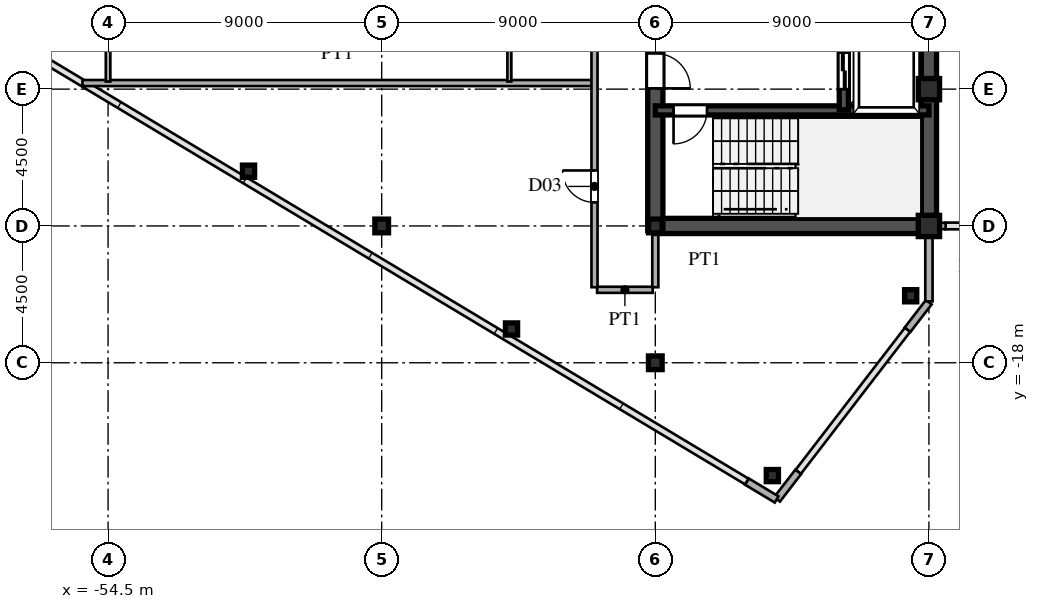
"""IFC4 building model, lengths in metres.
Left out: names, types, materials, properties, quantities, classifications, styles, units other than length and angle.
Written with IfcOpenShell. Run it as: python <this file> out.ifc"""

import sys

from ifc_helpers import new_model, si_unit, direction, frame, frame_2d, origin, origin_2d, place, context, subcontext, project, spatial, rectangle, hollow_rectangle, i_section, extrude, source, transform, mapped, element, fill, save


model = new_model("IFC4")
c1 = context("Model", 3, precision=1e-05, world=origin(), true_north=direction((0.0, 1.0)))
c2 = subcontext(c1, "Body", "Model", "MODEL_VIEW")
j1 = project(units=[si_unit("LENGTHUNIT", "METRE"), si_unit("PLANEANGLEUNIT", "RADIAN")], contexts=[c1])
p1 = place(None, origin())
s1 = spatial("IfcSite", under=j1, at=p1, CompositionType="ELEMENT")
p2 = place(p1, origin())
s2 = spatial("IfcBuilding", under=s1, at=p2, CompositionType="ELEMENT")
p3 = place(p2, frame((0.0, 0.0, 239.4)))
s3 = spatial("IfcBuildingStorey", under=s2, at=p3, CompositionType="ELEMENT", Elevation=239.4)
m1 = source(origin(), c2, "Body", "SweptSolid", [
    extrude(hollow_rectangle(XDim=0.7, YDim=0.7, WallThickness=0.03, at=origin_2d()), origin(), (0.0, 0.0, 1.0), 3.75),
])
for number, where, z_axis, x_axis in (
    (1, (-27.5, -13.5, 0.0), (0.0, 0.0, 1.0), (1.0, 0.0, 0.0)),
    (2, (-27.5, -9.0, 0.0), (0.0, 0.0, 1.0), (1.0, 0.0, 0.0)),
):
    element("IfcColumn", number, at=place(p3, frame(where, z_axis=z_axis, x_axis=x_axis)), inside=s3, PredefinedType="COLUMN", context=c2, shape_type="MappedRepresentation", body=[
        mapped(m1, transform((0.0, 0.0, 0.0), scale=1.0)),
    ])
m2 = source(origin(), c2, "Body", "SweptSolid", [
    extrude(i_section(OverallWidth=0.45, OverallDepth=0.45, WebThickness=0.016, FlangeThickness=0.025, at=origin_2d()), origin(), (0.0, 0.0, 1.0), 3.75),
])
for number, where, z_axis, x_axis in (
    (3, (-36.5, -18.0, 0.0), (0.0, 0.0, 1.0), (1.0, 0.0, 0.0)),
    (4, (-36.5, -13.5, 0.0), (0.0, 0.0, 1.0), (1.0, 0.0, 0.0)),
    (5, (-45.5, -13.5, 0.0), (0.0, 0.0, 1.0), (1.0, 0.0, 0.0)),
):
    element("IfcColumn", number, at=place(p3, frame(where, z_axis=z_axis, x_axis=x_axis)), inside=s3, PredefinedType="COLUMN", context=c2, shape_type="MappedRepresentation", body=[
        mapped(m2, transform((0.0, 0.0, 0.0), scale=1.0)),
    ])
m3 = source(origin(), c2, "Body", "SweptSolid", [
    extrude(hollow_rectangle(XDim=0.4, YDim=0.4, WallThickness=0.016, at=origin_2d()), origin(), (0.0, 0.0, 1.0), 3.75),
])
for number, where, z_axis, x_axis in (
    (6, (-28.1, -15.796, 0.0), (0.0, 0.0, 1.0), (1.0, 0.0, 0.0)),
    (7, (-32.65, -21.71, 0.0), (0.0, 0.0, 1.0), (1.0, 0.0, 0.0)),
    (8, (-41.23, -16.889, 0.0), (0.0, 0.0, 1.0), (1.0, 0.0, 0.0)),
    (9, (-49.88, -11.699, 0.0), (0.0, 0.0, 1.0), (1.0, 0.0, 0.0)),
):
    element("IfcColumn", number, at=place(p3, frame(where, z_axis=z_axis, x_axis=x_axis)), inside=s3, PredefinedType="COLUMN", context=c2, shape_type="MappedRepresentation", body=[
        mapped(m3, transform((0.0, 0.0, 0.0), scale=1.0)),
    ])
p4 = place(p3, frame((-27.5, -15.98, 0.0), z_axis=(0.0, 0.0, 1.0), x_axis=(0.0, 1.0, 0.0)))
e10 = element("IfcWall", 10, at=p4, inside=s3, PredefinedType="SOLIDWALL", context=c2, shape_type="SweptSolid", body=[
    extrude(rectangle(XDim=1.605, YDim=0.24, at=frame_2d((0.803, 0.0))), origin(), (0.0, 0.0, 1.0), 3.53),
])
p5 = place(p3, frame((-27.5, -14.375, 0.0), z_axis=(0.0, 0.0, 1.0), x_axis=(0.0, 1.0, 0.0)))
e11 = element("IfcWall", 11, at=p5, inside=s3, PredefinedType="SOLIDWALL", context=c2, shape_type="SweptSolid", body=[
    extrude(rectangle(XDim=0.62, YDim=0.24, at=frame_2d((0.31, 0.0))), origin(), (0.0, 0.0, 1.0), 3.03),
])
for number, where, z_axis, x_axis in (
    (12, (-33.486, -21.908, 0.0), (0.0, 0.0, 1.0), (0.857, -0.515, 0.0)),
    (13, (-32.494, -22.492, 0.0), (0.0, 0.0, 1.0), (0.61, 0.793, 0.0)),
    (14, (-28.201, -16.912, 0.0), (0.0, 0.0, 1.0), (0.61, 0.793, 0.0)),
):
    element("IfcWall", number, at=place(p3, frame(where, z_axis=z_axis, x_axis=x_axis)), inside=s3, PredefinedType="SOLIDWALL", context=c2, shape_type="SweptSolid", body=[
        extrude(rectangle(XDim=1.14, YDim=0.24, at=frame_2d((0.57, 0.0))), origin(), (0.0, 0.0, 1.0), 3.53),
    ])
p6 = place(p3, frame((-27.49, -13.5, 0.0), z_axis=(0.0, 0.0, 1.0), x_axis=(1.0, 0.0, 0.0)))
e15 = element("IfcWall", 15, at=p6, inside=s3, PredefinedType="SOLIDWALL", context=c2, shape_type="SweptSolid", body=[
    extrude(rectangle(XDim=0.54, YDim=0.21, at=frame_2d((0.27, 0.0))), origin(), (0.0, 0.0, 1.0), 3.03),
])
p7 = place(p3, frame((-27.5, -13.5, 0.0), z_axis=(0.0, 0.0, 1.0), x_axis=(0.0, 1.0, 0.0)))
e16 = element("IfcWall", 16, at=p7, inside=s3, PredefinedType="SHEAR", context=c2, shape_type="SweptSolid", body=[
    extrude(rectangle(XDim=12.2, YDim=0.5, at=frame_2d((6.1, 0.0))), origin(), (0.0, 0.0, 1.0), 3.53),
])
p8 = place(p3, frame((-36.5, -13.5, 0.0), z_axis=(0.0, 0.0, 1.0), x_axis=(1.0, 0.0, 0.0)))
e17 = element("IfcWall", 17, at=p8, inside=s3, PredefinedType="SHEAR", context=c2, shape_type="SweptSolid", body=[
    extrude(rectangle(XDim=9.0, YDim=0.5, at=frame_2d((4.5, 0.0))), origin(), (0.0, 0.0, 1.0), 3.53),
])
p9 = place(p3, frame((-36.5, -13.65, 0.0), z_axis=(0.0, 0.0, 1.0), x_axis=(0.0, 1.0, 0.0)))
e18 = element("IfcWall", 18, at=p9, inside=s3, PredefinedType="SHEAR", context=c2, shape_type="SweptSolid", body=[
    extrude(rectangle(XDim=7.15, YDim=0.5, at=frame_2d((3.575, 0.0))), origin(), (0.0, 0.0, 1.0), 3.53),
])
p10 = place(p9, frame((4.675, 0.0, 0.0)))
e19 = element("IfcOpeningElement", 19, at=p10, cuts=e18, PredefinedType="OPENING", context=c2, shape_type="SweptSolid", body=[
    extrude(rectangle(XDim=1.15, YDim=2.2, at=frame_2d((0.575, 1.1))), frame((0.0, 0.26, 0.0), z_axis=(0.0, -1.0, 0.0), x_axis=(1.0, 0.0, 0.0)), (0.0, 0.0, 1.0), 0.52),
])
p11 = place(p3, frame((-36.5, -9.7, 0.0), z_axis=(0.0, 0.0, 1.0), x_axis=(1.0, 0.0, 0.0)))
e20 = element("IfcWall", 20, at=p11, inside=s3, PredefinedType="SHEAR", context=c2, shape_type="SweptSolid", body=[
    extrude(rectangle(XDim=9.0, YDim=0.3, at=frame_2d((4.5, 0.0))), origin(), (0.0, 0.0, 1.0), 3.53),
])
p12 = place(p11, frame((0.6, 0.0, 0.0)))
e21 = element("IfcOpeningElement", 21, at=p12, cuts=e20, PredefinedType="OPENING", context=c2, shape_type="SweptSolid", body=[
    extrude(rectangle(XDim=1.1, YDim=2.2, at=frame_2d((0.55, 1.1))), frame((0.0, 0.16, 0.0), z_axis=(0.0, -1.0, 0.0), x_axis=(1.0, 0.0, 0.0)), (0.0, 0.0, 1.0), 0.32),
])
p13 = place(p3, frame((-30.3, -9.68, 0.0), z_axis=(0.0, 0.0, 1.0), x_axis=(0.0, 1.0, 0.0)))
e22 = element("IfcWall", 22, at=p13, inside=s3, PredefinedType="SHEAR", context=c2, shape_type="SweptSolid", body=[
    extrude(rectangle(XDim=2.56, YDim=0.3, at=frame_2d((1.28, 0.0))), origin(), (0.0, 0.0, 1.0), 3.53),
])
p14 = place(p13, frame((0.68, 0.0, 0.0)))
e23 = element("IfcOpeningElement", 23, at=p14, cuts=e22, PredefinedType="OPENING", context=c2, shape_type="SweptSolid", body=[
    extrude(rectangle(XDim=1.2, YDim=2.25, at=frame_2d((0.6, 1.125))), frame((0.0, 0.16, 0.0), z_axis=(0.0, -1.0, 0.0), x_axis=(1.0, 0.0, 0.0)), (0.0, 0.0, 1.0), 0.32),
])
p15 = place(p3, frame((-38.415, -15.6, 0.0), z_axis=(0.0, 0.0, 1.0), x_axis=(1.0, 0.0, 0.0)))
e24 = element("IfcWall", 24, at=p15, inside=s3, PredefinedType="PARTITIONING", context=c2, shape_type="SweptSolid", body=[
    extrude(rectangle(XDim=1.83, YDim=0.2, at=frame_2d((0.915, 0.0))), origin(), (0.0, 0.0, 1.0), 3.53),
])
p16 = place(p3, frame((-55.343, -8.8, 0.0), z_axis=(0.0, 0.0, 1.0), x_axis=(1.0, 0.0, 0.0)))
e25 = element("IfcWall", 25, at=p16, inside=s3, PredefinedType="PARTITIONING", context=c2, shape_type="SweptSolid", body=[
    extrude(rectangle(XDim=16.763, YDim=0.2, at=frame_2d((8.381, 0.0))), origin(), (0.0, 0.0, 1.0), 3.53),
])
p17 = place(p3, frame((-54.5, -8.75, 0.0), z_axis=(0.0, 0.0, 1.0), x_axis=(0.0, 1.0, 0.0)))
e26 = element("IfcWall", 26, at=p17, inside=s3, PredefinedType="PARTITIONING", context=c2, shape_type="SweptSolid", body=[
    extrude(rectangle(XDim=12.3, YDim=0.15, at=frame_2d((6.15, 0.0))), origin(), (0.0, 0.0, 1.0), 2.93),
])
p18 = place(p17, frame((5.675, 0.0, 0.0)))
e27 = element("IfcOpeningElement", 27, at=p18, cuts=e26, PredefinedType="OPENING", context=c2, shape_type="SweptSolid", body=[
    extrude(rectangle(XDim=0.95, YDim=2.15, at=frame_2d((0.475, 1.075))), frame((0.0, 0.085, 0.0), z_axis=(0.0, -1.0, 0.0), x_axis=(1.0, 0.0, 0.0)), (0.0, 0.0, 1.0), 0.17),
])
p19 = place(p3, frame((-41.3, -8.75, 0.0), z_axis=(0.0, 0.0, 1.0), x_axis=(0.0, 1.0, 0.0)))
e28 = element("IfcWall", 28, at=p19, inside=s3, PredefinedType="PARTITIONING", context=c2, shape_type="SweptSolid", body=[
    extrude(rectangle(XDim=3.246, YDim=0.13, at=frame_2d((1.623, 0.0))), origin(), (0.0, 0.0, 1.0), 3.53),
])
p20 = place(p3, frame((-38.5, -15.515, 0.0), z_axis=(0.0, 0.0, 1.0), x_axis=(0.0, 1.0, 0.0)))
e29 = element("IfcWall", 29, at=p20, inside=s3, PredefinedType="PARTITIONING", context=c2, shape_type="SweptSolid", body=[
    extrude(rectangle(XDim=31.03, YDim=0.2, at=frame_2d((15.515, 0.0))), origin(), (0.0, 0.0, 1.0), 3.53),
])
p21 = place(p20, frame((2.79, 0.0, 0.0)))
e30 = element("IfcOpeningElement", 30, at=p21, cuts=e29, PredefinedType="OPENING", context=c2, shape_type="SweptSolid", body=[
    extrude(rectangle(XDim=1.05, YDim=2.25, at=frame_2d((0.525, 1.125))), frame((0.0, 0.11, 0.0), z_axis=(0.0, -1.0, 0.0), x_axis=(1.0, 0.0, 0.0)), (0.0, 0.0, 1.0), 0.22),
])
p22 = place(p20, frame((12.204, 0.0, 0.0)))
e31 = element("IfcOpeningElement", 31, at=p22, cuts=e29, PredefinedType="OPENING", context=c2, shape_type="SweptSolid", body=[
    extrude(rectangle(XDim=1.05, YDim=2.25, at=frame_2d((0.525, 1.125))), frame((0.0, 0.11, 0.0), z_axis=(0.0, -1.0, 0.0), x_axis=(1.0, 0.0, 0.0)), (0.0, 0.0, 1.0), 0.22),
])
p23 = place(p20, frame((24.59, 0.0, 0.0)))
e32 = element("IfcOpeningElement", 32, at=p23, cuts=e29, PredefinedType="OPENING", context=c2, shape_type="SweptSolid", body=[
    extrude(rectangle(XDim=1.05, YDim=2.25, at=frame_2d((0.525, 1.125))), frame((0.0, 0.11, 0.0), z_axis=(0.0, -1.0, 0.0), x_axis=(1.0, 0.0, 0.0)), (0.0, 0.0, 1.0), 0.22),
])
p24 = place(p3, frame((-36.5, -15.515, 0.0), z_axis=(0.0, 0.0, 1.0), x_axis=(0.0, 1.0, 0.0)))
e33 = element("IfcWall", 33, at=p24, inside=s3, PredefinedType="PARTITIONING", context=c2, shape_type="SweptSolid", body=[
    extrude(rectangle(XDim=1.76, YDim=0.2, at=frame_2d((0.88, 0.0))), origin(), (0.0, 0.0, 1.0), 2.93),
])
m4 = source(origin(), c2, "Body", "SweptSolid", [
    extrude(rectangle(XDim=1.15, YDim=2.2, at=frame_2d((0.575, 1.1))), frame((0.0, 0.025, 0.0), z_axis=(0.0, -1.0, 0.0), x_axis=(1.0, 0.0, 0.0)), (0.0, 0.0, 1.0), 0.05),
])
p25 = place(p10, frame((1.15, 0.0, 0.0), z_axis=(0.0, 0.0, 1.0), x_axis=(-1.0, 0.0, 0.0)))
e34 = element("IfcDoor", 34, at=p25, inside=s3, OperationType="SINGLE_SWING_LEFT", PredefinedType="DOOR", context=c2, shape_type="MappedRepresentation", body=[
    mapped(m4, transform((0.0, 0.0, 0.0), scale=1.0)),
])
fill(e19, e34)
m5 = source(origin(), c2, "Body", "SweptSolid", [
    extrude(rectangle(XDim=1.1, YDim=2.2, at=frame_2d((0.55, 1.1))), frame((0.0, 0.025, 0.0), z_axis=(0.0, -1.0, 0.0), x_axis=(1.0, 0.0, 0.0)), (0.0, 0.0, 1.0), 0.05),
])
p26 = place(p12, frame((1.1, 0.0, 0.0), z_axis=(0.0, 0.0, 1.0), x_axis=(-1.0, 0.0, 0.0)))
e35 = element("IfcDoor", 35, at=p26, inside=s3, OperationType="SINGLE_SWING_LEFT", PredefinedType="DOOR", context=c2, shape_type="MappedRepresentation", body=[
    mapped(m5, transform((0.0, 0.0, 0.0), scale=1.0)),
])
fill(e21, e35)
m6 = source(origin(), c2, "Body", "SweptSolid", [
    extrude(rectangle(XDim=1.2, YDim=2.25, at=frame_2d((0.6, 1.125))), frame((0.0, 0.025, 0.0), z_axis=(0.0, -1.0, 0.0), x_axis=(1.0, 0.0, 0.0)), (0.0, 0.0, 1.0), 0.05),
])
p27 = place(p14, origin())
e36 = element("IfcDoor", 36, at=p27, inside=s3, OperationType="DOUBLE_DOOR_SLIDING", PredefinedType="DOOR", context=c2, shape_type="MappedRepresentation", body=[
    mapped(m6, transform((0.0, 0.0, 0.0), scale=1.0)),
])
fill(e23, e36)
m7 = source(origin(), c2, "Body", "SweptSolid", [
    extrude(rectangle(XDim=1.05, YDim=2.25, at=frame_2d((0.525, 1.125))), frame((0.0, 0.025, 0.0), z_axis=(0.0, -1.0, 0.0), x_axis=(1.0, 0.0, 0.0)), (0.0, 0.0, 1.0), 0.05),
])
p28 = place(p21, origin())
e37 = element("IfcDoor", 37, at=p28, inside=s3, OperationType="SINGLE_SWING_RIGHT", PredefinedType="DOOR", context=c2, shape_type="MappedRepresentation", body=[
    mapped(m7, transform((0.0, 0.0, 0.0), scale=1.0)),
])
fill(e30, e37)
save(model, sys.argv[1])
